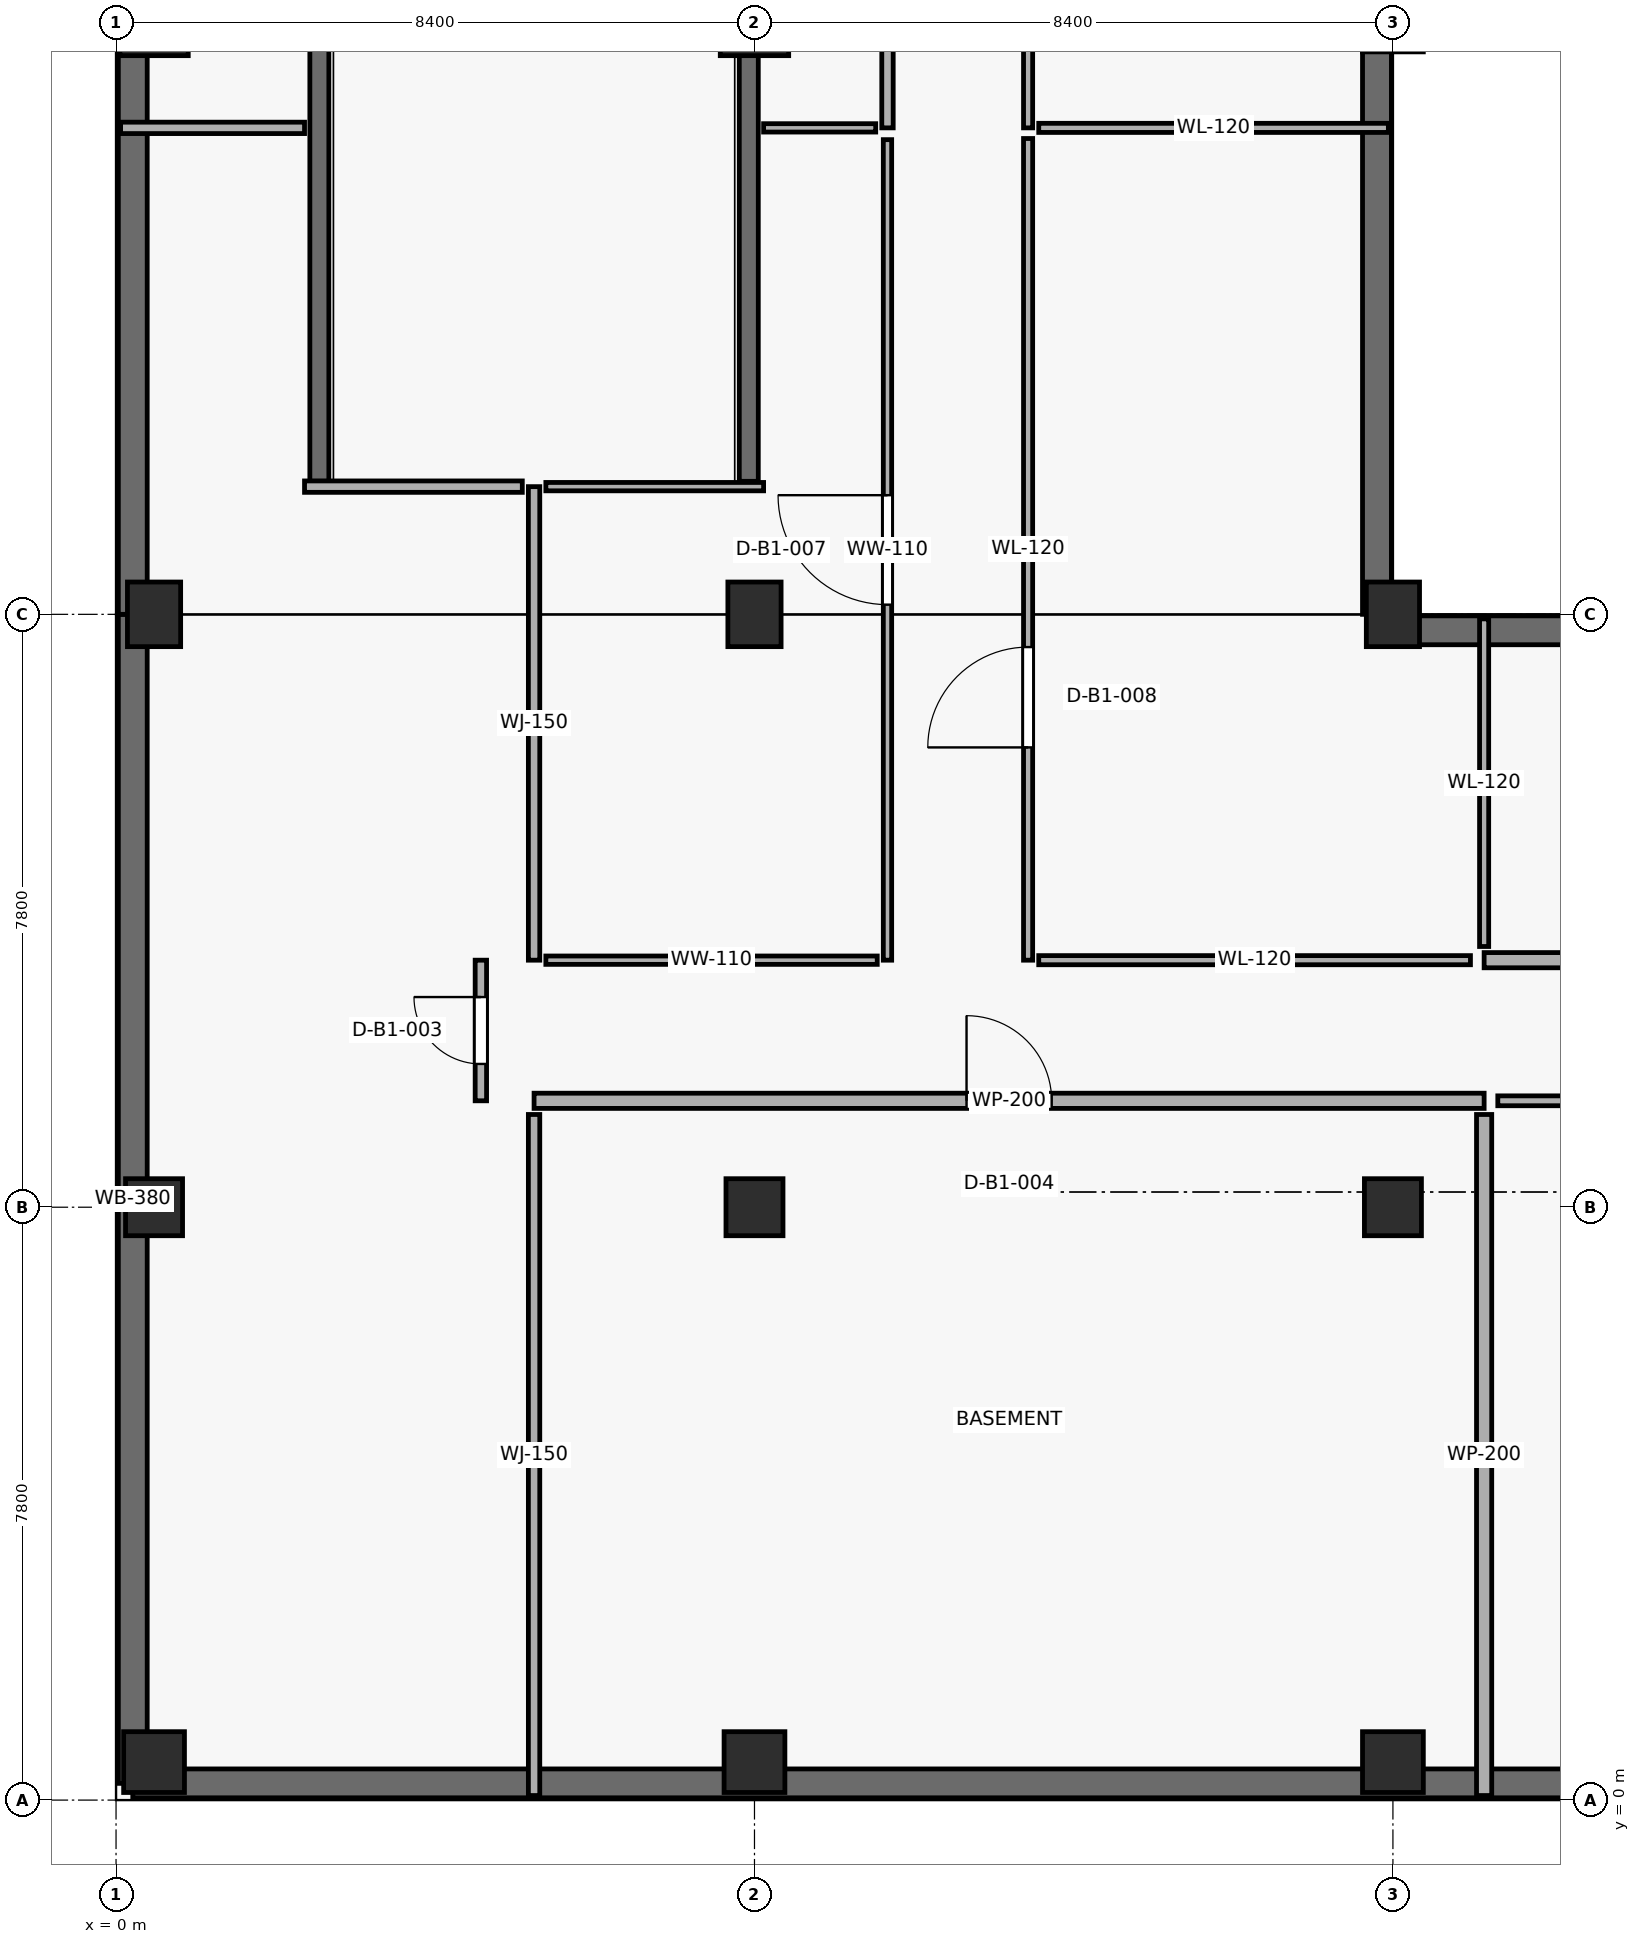
"""IFC4 building model, lengths in metres.
Left out: names, types, materials, properties, quantities, classifications, styles, units other than length and angle.
Written with IfcOpenShell. Run it as: python <this file> out.ifc"""

import sys

from ifc_helpers import new_model, si_unit, direction, frame, frame_2d, origin, origin_2d, place, context, subcontext, project, spatial, rectangle, extrude, element, fill, save


model = new_model("IFC4")
c1 = context("Model", 3, precision=1e-05, world=origin(), true_north=direction((0.0, 1.0)))
c2 = subcontext(c1, "Body", "Model", "MODEL_VIEW")
j1 = project(units=[si_unit("LENGTHUNIT", "METRE"), si_unit("PLANEANGLEUNIT", "RADIAN")], contexts=[c1])
p1 = place(None, origin())
s1 = spatial("IfcSite", under=j1, at=p1, CompositionType="ELEMENT")
p2 = place(p1, origin())
s2 = spatial("IfcBuilding", under=s1, at=p2, CompositionType="ELEMENT")
p3 = place(p2, frame((0.0, 0.0, -4.5)))
s3 = spatial("IfcBuildingStorey", under=s2, at=p3, CompositionType="ELEMENT", Elevation=-4.5)
p4 = place(p3, frame((0.5, 0.5, -0.3), z_axis=(0.0, 0.0, 1.0), x_axis=(1.0, 0.0, 0.0)))
e1 = element("IfcColumn", 1, at=p4, inside=s3, PredefinedType="COLUMN", context=c2, shape_type="SweptSolid", body=[
    extrude(rectangle(XDim=0.8, YDim=0.8, at=origin_2d()), origin(), (0.0, 0.0, 1.0), 4.8),
])
p5 = place(p3, frame((0.5, 7.8, -0.3), z_axis=(0.0, 0.0, 1.0), x_axis=(1.0, 0.0, 0.0)))
e2 = element("IfcColumn", 2, at=p5, inside=s3, PredefinedType="COLUMN", context=c2, shape_type="SweptSolid", body=[
    extrude(rectangle(XDim=0.75, YDim=0.75, at=origin_2d()), origin(), (0.0, 0.0, 1.0), 4.8),
])
p6 = place(p3, frame((0.5, 15.6, -0.3), z_axis=(0.0, 0.0, 1.0), x_axis=(1.0, 0.0, 0.0)))
e3 = element("IfcColumn", 3, at=p6, inside=s3, PredefinedType="COLUMN", context=c2, shape_type="SweptSolid", body=[
    extrude(rectangle(XDim=0.7, YDim=0.85, at=origin_2d()), origin(), (0.0, 0.0, 1.0), 4.8),
])
p7 = place(p3, frame((0.5, 23.4, -0.3), z_axis=(0.0, 0.0, 1.0), x_axis=(1.0, 0.0, 0.0)))
e4 = element("IfcColumn", 4, at=p7, inside=s3, PredefinedType="COLUMN", context=c2, shape_type="SweptSolid", body=[
    extrude(rectangle(XDim=0.9, YDim=0.9, at=origin_2d()), origin(), (0.0, 0.0, 1.0), 4.8),
])
p8 = place(p3, frame((8.4, 0.5, -0.3), z_axis=(0.0, 0.0, 1.0), x_axis=(1.0, 0.0, 0.0)))
e5 = element("IfcColumn", 5, at=p8, inside=s3, PredefinedType="COLUMN", context=c2, shape_type="SweptSolid", body=[
    extrude(rectangle(XDim=0.8, YDim=0.8, at=origin_2d()), origin(), (0.0, 0.0, 1.0), 4.8),
])
p9 = place(p3, frame((8.4, 7.8, -0.3), z_axis=(0.0, 0.0, 1.0), x_axis=(1.0, 0.0, 0.0)))
e6 = element("IfcColumn", 6, at=p9, inside=s3, PredefinedType="COLUMN", context=c2, shape_type="SweptSolid", body=[
    extrude(rectangle(XDim=0.75, YDim=0.75, at=origin_2d()), origin(), (0.0, 0.0, 1.0), 4.8),
])
p10 = place(p3, frame((8.4, 15.6, -0.3), z_axis=(0.0, 0.0, 1.0), x_axis=(1.0, 0.0, 0.0)))
e7 = element("IfcColumn", 7, at=p10, inside=s3, PredefinedType="COLUMN", context=c2, shape_type="SweptSolid", body=[
    extrude(rectangle(XDim=0.7, YDim=0.85, at=origin_2d()), origin(), (0.0, 0.0, 1.0), 4.8),
])
p11 = place(p3, frame((8.4, 23.4, -0.3), z_axis=(0.0, 0.0, 1.0), x_axis=(1.0, 0.0, 0.0)))
e8 = element("IfcColumn", 8, at=p11, inside=s3, PredefinedType="COLUMN", context=c2, shape_type="SweptSolid", body=[
    extrude(rectangle(XDim=0.9, YDim=0.9, at=origin_2d()), origin(), (0.0, 0.0, 1.0), 4.8),
])
p12 = place(p3, frame((16.8, 0.5, -0.3), z_axis=(0.0, 0.0, 1.0), x_axis=(1.0, 0.0, 0.0)))
e9 = element("IfcColumn", 9, at=p12, inside=s3, PredefinedType="COLUMN", context=c2, shape_type="SweptSolid", body=[
    extrude(rectangle(XDim=0.8, YDim=0.8, at=origin_2d()), origin(), (0.0, 0.0, 1.0), 4.8),
])
p13 = place(p3, frame((16.8, 7.8, -0.3), z_axis=(0.0, 0.0, 1.0), x_axis=(1.0, 0.0, 0.0)))
e10 = element("IfcColumn", 10, at=p13, inside=s3, PredefinedType="COLUMN", context=c2, shape_type="SweptSolid", body=[
    extrude(rectangle(XDim=0.75, YDim=0.75, at=origin_2d()), origin(), (0.0, 0.0, 1.0), 4.8),
])
p14 = place(p3, frame((16.8, 15.6, -0.3), z_axis=(0.0, 0.0, 1.0), x_axis=(1.0, 0.0, 0.0)))
e11 = element("IfcColumn", 11, at=p14, inside=s3, PredefinedType="COLUMN", context=c2, shape_type="SweptSolid", body=[
    extrude(rectangle(XDim=0.7, YDim=0.85, at=origin_2d()), origin(), (0.0, 0.0, 1.0), 4.8),
])
p15 = place(p3, frame((16.8, 23.4, -0.3), z_axis=(0.0, 0.0, 1.0), x_axis=(1.0, 0.0, 0.0)))
e12 = element("IfcColumn", 12, at=p15, inside=s3, PredefinedType="COLUMN", context=c2, shape_type="SweptSolid", body=[
    extrude(rectangle(XDim=0.8, YDim=0.8, at=origin_2d()), origin(), (0.0, 0.0, 1.0), 4.8),
])
p16 = place(p3, frame((16.59, 48.0, 0.0), z_axis=(0.0, 0.0, 1.0), x_axis=(0.0, -1.0, 0.0)))
e13 = element("IfcWall", 13, at=p16, inside=s3, PredefinedType="SOLIDWALL", context=c2, shape_type="SweptSolid", body=[
    extrude(rectangle(XDim=32.4, YDim=0.38, at=frame_2d((16.2, 0.0))), origin(), (0.0, 0.0, 1.0), 4.22),
])
p17 = place(p3, frame((16.8, 15.39, 0.0), z_axis=(0.0, 0.0, 1.0), x_axis=(1.0, 0.0, 0.0)))
e14 = element("IfcWall", 14, at=p17, inside=s3, PredefinedType="SOLIDWALL", context=c2, shape_type="SweptSolid", body=[
    extrude(rectangle(XDim=37.8, YDim=0.38, at=frame_2d((18.9, 0.0))), origin(), (0.0, 0.0, 1.0), 4.22),
])
p18 = place(p3, frame((58.8, 0.22, 0.0), z_axis=(0.0, 0.0, 1.0), x_axis=(-1.0, 0.0, 0.0)))
e15 = element("IfcWall", 15, at=p18, inside=s3, PredefinedType="SOLIDWALL", context=c2, shape_type="SweptSolid", body=[
    extrude(rectangle(XDim=58.58, YDim=0.38, at=frame_2d((29.29, 0.0))), origin(), (0.0, 0.0, 1.0), 4.22),
])
p19 = place(p3, frame((0.22, 0.22, 0.0), z_axis=(0.0, 0.0, 1.0), x_axis=(0.0, 1.0, 0.0)))
e16 = element("IfcWall", 16, at=p19, inside=s3, PredefinedType="SOLIDWALL", context=c2, shape_type="SweptSolid", body=[
    extrude(rectangle(XDim=15.38, YDim=0.38, at=frame_2d((7.69, 0.0))), origin(), (0.0, 0.0, 1.0), 4.22),
])
p20 = place(p3, frame((0.22, 15.6, 0.0), z_axis=(0.0, 0.0, 1.0), x_axis=(0.0, 1.0, 0.0)))
e17 = element("IfcWall", 17, at=p20, inside=s3, PredefinedType="SOLIDWALL", context=c2, shape_type="SweptSolid", body=[
    extrude(rectangle(XDim=40.8, YDim=0.38, at=frame_2d((20.4, 0.0))), origin(), (0.0, 0.0, 1.0), 4.22),
])
for number, where, z_axis, x_axis in (
    (18, (2.675, 17.35, 0.0), (0.0, 0.0, 1.0), (0.0, 1.0, 0.0)),
    (19, (8.325, 17.35, 0.0), (0.0, 0.0, 1.0), (0.0, 1.0, 0.0)),
):
    element("IfcWall", number, at=place(p3, frame(where, z_axis=z_axis, x_axis=x_axis)), inside=s3, PredefinedType="SHEAR", context=c2, shape_type="SweptSolid", body=[
        extrude(rectangle(XDim=28.1, YDim=0.25, at=frame_2d((14.05, 0.0))), origin(), (0.0, 0.0, 1.0), 4.17),
    ])
p21 = place(p3, frame((10.15, 52.6, 0.0), z_axis=(0.0, 0.0, 1.0), x_axis=(0.0, -1.0, 0.0)))
e20 = element("IfcWall", 20, at=p21, inside=s3, PredefinedType="PARTITIONING", context=c2, shape_type="SweptSolid", body=[
    extrude(rectangle(XDim=30.6, YDim=0.15, at=frame_2d((15.3, 0.0))), origin(), (0.0, 0.0, 1.0), 4.22),
])
p22 = place(p21, frame((14.58, 0.0, 0.0)))
e21 = element("IfcOpeningElement", 21, at=p22, cuts=e20, PredefinedType="OPENING", context=c2, shape_type="SweptSolid", body=[
    extrude(rectangle(XDim=1.44, YDim=2.34, at=frame_2d((0.72, 1.17))), frame((0.0, 0.085, 0.0), z_axis=(0.0, -1.0, 0.0), x_axis=(1.0, 0.0, 0.0)), (0.0, 0.0, 1.0), 0.17),
])
p23 = place(p3, frame((12.0, 22.0, 0.0), z_axis=(0.0, 0.0, 1.0), x_axis=(0.0, 1.0, 0.0)))
e22 = element("IfcWall", 22, at=p23, inside=s3, PredefinedType="PARTITIONING", context=c2, shape_type="SweptSolid", body=[
    extrude(rectangle(XDim=16.4, YDim=0.12, at=frame_2d((8.2, 0.0))), origin(), (0.0, 0.0, 1.0), 4.22),
])
p24 = place(p23, frame((7.54, 0.0, 0.0)))
e23 = element("IfcOpeningElement", 23, at=p24, cuts=e22, PredefinedType="OPENING", context=c2, shape_type="SweptSolid", body=[
    extrude(rectangle(XDim=1.32, YDim=2.24, at=frame_2d((0.66, 1.12))), frame((0.0, 0.07, 0.0), z_axis=(0.0, -1.0, 0.0), x_axis=(1.0, 0.0, 0.0)), (0.0, 0.0, 1.0), 0.14),
])
p25 = place(p3, frame((5.5, 9.2, 0.0), z_axis=(0.0, 0.0, 1.0), x_axis=(1.0, 0.0, 0.0)))
e24 = element("IfcWall", 24, at=p25, inside=s3, PredefinedType="PARTITIONING", context=c2, shape_type="SweptSolid", body=[
    extrude(rectangle(XDim=12.5, YDim=0.2, at=frame_2d((6.25, 0.0))), origin(), (0.0, 0.0, 1.0), 4.22),
])
p26 = place(p25, frame((5.69, 0.0, 0.0)))
e25 = element("IfcOpeningElement", 25, at=p26, cuts=e24, PredefinedType="OPENING", context=c2, shape_type="SweptSolid", body=[
    extrude(rectangle(XDim=1.12, YDim=2.15, at=frame_2d((0.56, 1.075))), frame((0.0, 0.11, 0.0), z_axis=(0.0, -1.0, 0.0), x_axis=(1.0, 0.0, 0.0)), (0.0, 0.0, 1.0), 0.22),
])
p27 = place(p3, frame((10.15, 21.845, 0.0), z_axis=(0.0, 0.0, 1.0), x_axis=(0.0, -1.0, 0.0)))
e26 = element("IfcWall", 26, at=p27, inside=s3, PredefinedType="PARTITIONING", context=c2, shape_type="SweptSolid", body=[
    extrude(rectangle(XDim=10.795, YDim=0.11, at=frame_2d((5.397, 0.0))), origin(), (0.0, 0.0, 1.0), 4.22),
])
p28 = place(p27, frame((4.677, 0.0, 0.0)))
e27 = element("IfcOpeningElement", 27, at=p28, cuts=e26, PredefinedType="OPENING", context=c2, shape_type="SweptSolid", body=[
    extrude(rectangle(XDim=1.44, YDim=2.34, at=frame_2d((0.72, 1.17))), frame((0.0, 0.065, 0.0), z_axis=(0.0, -1.0, 0.0), x_axis=(1.0, 0.0, 0.0)), (0.0, 0.0, 1.0), 0.13),
])
p29 = place(p3, frame((12.0, 11.05, 0.0), z_axis=(0.0, 0.0, 1.0), x_axis=(0.0, 1.0, 0.0)))
e28 = element("IfcWall", 28, at=p29, inside=s3, PredefinedType="PARTITIONING", context=c2, shape_type="SweptSolid", body=[
    extrude(rectangle(XDim=10.81, YDim=0.12, at=frame_2d((5.405, 0.0))), origin(), (0.0, 0.0, 1.0), 4.22),
])
p30 = place(p29, frame((2.799, 0.0, 0.0)))
e29 = element("IfcOpeningElement", 29, at=p30, cuts=e28, PredefinedType="OPENING", context=c2, shape_type="SweptSolid", body=[
    extrude(rectangle(XDim=1.32, YDim=2.24, at=frame_2d((0.66, 1.12))), frame((0.0, 0.07, 0.0), z_axis=(0.0, -1.0, 0.0), x_axis=(1.0, 0.0, 0.0)), (0.0, 0.0, 1.0), 0.14),
])
p31 = place(p3, frame((5.5, 9.02, 0.0), z_axis=(0.0, 0.0, 1.0), x_axis=(0.0, -1.0, 0.0)))
e30 = element("IfcWall", 30, at=p31, inside=s3, PredefinedType="PARTITIONING", context=c2, shape_type="SweptSolid", body=[
    extrude(rectangle(XDim=8.96, YDim=0.15, at=frame_2d((4.48, 0.0))), origin(), (0.0, 0.0, 1.0), 4.22),
])
p32 = place(p3, frame((18.0, 9.02, 0.0), z_axis=(0.0, 0.0, 1.0), x_axis=(0.0, -1.0, 0.0)))
e31 = element("IfcWall", 31, at=p32, inside=s3, PredefinedType="PARTITIONING", context=c2, shape_type="SweptSolid", body=[
    extrude(rectangle(XDim=8.96, YDim=0.2, at=frame_2d((4.48, 0.0))), origin(), (0.0, 0.0, 1.0), 4.22),
])
p33 = place(p3, frame((18.18, 9.2, 0.0), z_axis=(0.0, 0.0, 1.0), x_axis=(1.0, 0.0, 0.0)))
e32 = element("IfcWall", 32, at=p33, inside=s3, PredefinedType="PARTITIONING", context=c2, shape_type="SweptSolid", body=[
    extrude(rectangle(XDim=8.02, YDim=0.13, at=frame_2d((4.01, 0.0))), origin(), (0.0, 0.0, 1.0), 4.22),
])
p34 = place(p3, frame((26.2, 11.05, 0.0), z_axis=(0.0, 0.0, 1.0), x_axis=(-1.0, 0.0, 0.0)))
e33 = element("IfcWall", 33, at=p34, inside=s3, PredefinedType="PARTITIONING", context=c2, shape_type="SweptSolid", body=[
    extrude(rectangle(XDim=8.2, YDim=0.2, at=frame_2d((4.1, 0.0))), origin(), (0.0, 0.0, 1.0), 4.22),
])
p35 = place(p3, frame((5.5, 17.28, 0.0), z_axis=(0.0, 0.0, 1.0), x_axis=(0.0, -1.0, 0.0)))
e34 = element("IfcWall", 34, at=p35, inside=s3, PredefinedType="PARTITIONING", context=c2, shape_type="SweptSolid", body=[
    extrude(rectangle(XDim=6.23, YDim=0.15, at=frame_2d((3.115, 0.0))), origin(), (0.0, 0.0, 1.0), 4.22),
])
p36 = place(p3, frame((17.82, 11.05, 0.0), z_axis=(0.0, 0.0, 1.0), x_axis=(-1.0, 0.0, 0.0)))
e35 = element("IfcWall", 35, at=p36, inside=s3, PredefinedType="PARTITIONING", context=c2, shape_type="SweptSolid", body=[
    extrude(rectangle(XDim=5.68, YDim=0.12, at=frame_2d((2.84, 0.0))), origin(), (0.0, 0.0, 1.0), 4.22),
])
p37 = place(p3, frame((12.14, 22.0, 0.0), z_axis=(0.0, 0.0, 1.0), x_axis=(1.0, 0.0, 0.0)))
e36 = element("IfcWall", 36, at=p37, inside=s3, PredefinedType="PARTITIONING", context=c2, shape_type="SweptSolid", body=[
    extrude(rectangle(XDim=4.6, YDim=0.12, at=frame_2d((2.3, 0.0))), origin(), (0.0, 0.0, 1.0), 4.22),
])
p38 = place(p3, frame((10.015, 11.05, 0.0), z_axis=(0.0, 0.0, 1.0), x_axis=(-1.0, 0.0, 0.0)))
e37 = element("IfcWall", 37, at=p38, inside=s3, PredefinedType="PARTITIONING", context=c2, shape_type="SweptSolid", body=[
    extrude(rectangle(XDim=4.36, YDim=0.11, at=frame_2d((2.18, 0.0))), origin(), (0.0, 0.0, 1.0), 4.22),
])
p39 = place(p3, frame((18.0, 15.54, 0.0), z_axis=(0.0, 0.0, 1.0), x_axis=(0.0, -1.0, 0.0)))
e38 = element("IfcWall", 38, at=p39, inside=s3, PredefinedType="PARTITIONING", context=c2, shape_type="SweptSolid", body=[
    extrude(rectangle(XDim=4.31, YDim=0.12, at=frame_2d((2.155, 0.0))), origin(), (0.0, 0.0, 1.0), 4.22),
])
p40 = place(p3, frame((2.48, 17.28, 0.0), z_axis=(0.0, 0.0, 1.0), x_axis=(1.0, 0.0, 0.0)))
e39 = element("IfcWall", 39, at=p40, inside=s3, PredefinedType="PARTITIONING", context=c2, shape_type="SweptSolid", body=[
    extrude(rectangle(XDim=2.865, YDim=0.15, at=frame_2d((1.433, 0.0))), origin(), (0.0, 0.0, 1.0), 4.22),
])
p41 = place(p3, frame((5.655, 17.28, 0.0), z_axis=(0.0, 0.0, 1.0), x_axis=(1.0, 0.0, 0.0)))
e40 = element("IfcWall", 40, at=p41, inside=s3, PredefinedType="PARTITIONING", context=c2, shape_type="SweptSolid", body=[
    extrude(rectangle(XDim=2.865, YDim=0.11, at=frame_2d((1.433, 0.0))), origin(), (0.0, 0.0, 1.0), 4.22),
])
p42 = place(p3, frame((0.06, 22.0, 0.0), z_axis=(0.0, 0.0, 1.0), x_axis=(1.0, 0.0, 0.0)))
e41 = element("IfcWall", 41, at=p42, inside=s3, PredefinedType="PARTITIONING", context=c2, shape_type="SweptSolid", body=[
    extrude(rectangle(XDim=2.42, YDim=0.15, at=frame_2d((1.21, 0.0))), origin(), (0.0, 0.0, 1.0), 4.22),
])
p43 = place(p3, frame((4.8, 11.05, 0.0), z_axis=(0.0, 0.0, 1.0), x_axis=(0.0, -1.0, 0.0)))
e42 = element("IfcWall", 42, at=p43, inside=s3, PredefinedType="PARTITIONING", context=c2, shape_type="SweptSolid", body=[
    extrude(rectangle(XDim=1.85, YDim=0.15, at=frame_2d((0.925, 0.0))), origin(), (0.0, 0.0, 1.0), 4.22),
])
p44 = place(p43, frame((0.485, 0.0, 0.0)))
e43 = element("IfcOpeningElement", 43, at=p44, cuts=e42, PredefinedType="OPENING", context=c2, shape_type="SweptSolid", body=[
    extrude(rectangle(XDim=0.88, YDim=2.1, at=frame_2d((0.44, 1.05))), frame((0.0, 0.085, 0.0), z_axis=(0.0, -1.0, 0.0), x_axis=(1.0, 0.0, 0.0)), (0.0, 0.0, 1.0), 0.17),
])
p45 = place(p3, frame((8.52, 22.0, 0.0), z_axis=(0.0, 0.0, 1.0), x_axis=(1.0, 0.0, 0.0)))
e44 = element("IfcWall", 44, at=p45, inside=s3, PredefinedType="PARTITIONING", context=c2, shape_type="SweptSolid", body=[
    extrude(rectangle(XDim=1.475, YDim=0.11, at=frame_2d((0.738, 0.0))), origin(), (0.0, 0.0, 1.0), 4.22),
])
p46 = place(p44, origin())
e45 = element("IfcDoor", 45, at=p46, inside=s3, OperationType="SINGLE_SWING_RIGHT", PredefinedType="DOOR", context=c2, shape_type="SweptSolid", body=[
    extrude(rectangle(XDim=0.88, YDim=2.1, at=frame_2d((0.44, 1.05))), frame((0.0, 0.025, 0.0), z_axis=(0.0, -1.0, 0.0), x_axis=(1.0, 0.0, 0.0)), (0.0, 0.0, 1.0), 0.05),
])
fill(e43, e45)
p47 = place(p26, origin())
e46 = element("IfcDoor", 46, at=p47, inside=s3, OperationType="SINGLE_SWING_LEFT", PredefinedType="DOOR", context=c2, shape_type="SweptSolid", body=[
    extrude(rectangle(XDim=1.12, YDim=2.15, at=frame_2d((0.56, 1.075))), frame((0.0, 0.025, 0.0), z_axis=(0.0, -1.0, 0.0), x_axis=(1.0, 0.0, 0.0)), (0.0, 0.0, 1.0), 0.05),
])
fill(e25, e46)
p48 = place(p28, origin())
e47 = element("IfcDoor", 47, at=p48, inside=s3, OperationType="SINGLE_SWING_RIGHT", PredefinedType="DOOR", context=c2, shape_type="SweptSolid", body=[
    extrude(rectangle(XDim=1.44, YDim=2.34, at=frame_2d((0.72, 1.17))), frame((0.0, 0.025, 0.0), z_axis=(0.0, -1.0, 0.0), x_axis=(1.0, 0.0, 0.0)), (0.0, 0.0, 1.0), 0.05),
])
fill(e27, e47)
p49 = place(p30, origin())
e48 = element("IfcDoor", 48, at=p49, inside=s3, OperationType="SINGLE_SWING_LEFT", PredefinedType="DOOR", context=c2, shape_type="SweptSolid", body=[
    extrude(rectangle(XDim=1.32, YDim=2.24, at=frame_2d((0.66, 1.12))), frame((0.0, 0.025, 0.0), z_axis=(0.0, -1.0, 0.0), x_axis=(1.0, 0.0, 0.0)), (0.0, 0.0, 1.0), 0.05),
])
fill(e29, e48)
save(model, sys.argv[1])
